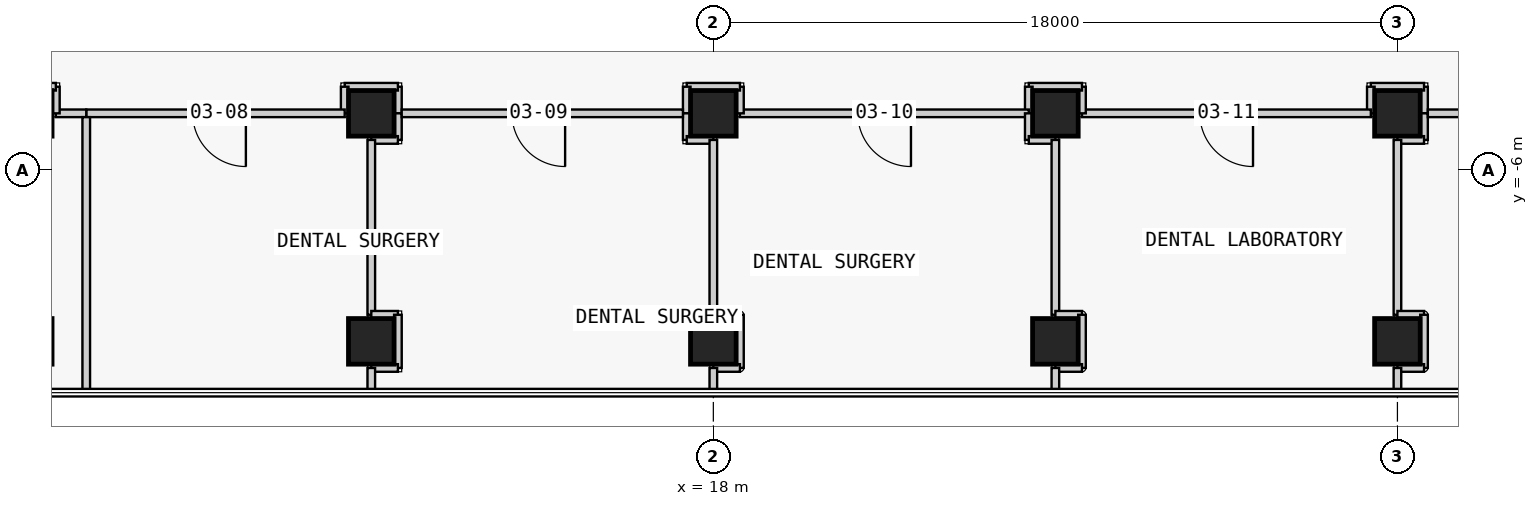
"""IFC4 building model, lengths in metres.
Left out: names, types, materials, properties, quantities, classifications, styles, units other than length and angle.
Written with IfcOpenShell. Run it as: python <this file> out.ifc"""

import sys

from ifc_helpers import new_model, si_unit, direction, frame, frame_2d, origin, origin_2d, place, context, subcontext, project, spatial, rectangle, extrude, element, fill, save


model = new_model("IFC4")
c1 = context("Model", 3, precision=1e-05, world=origin(), true_north=direction((0.0, 1.0)))
c2 = subcontext(c1, "Body", "Model", "MODEL_VIEW")
j1 = project(units=[si_unit("LENGTHUNIT", "METRE"), si_unit("PLANEANGLEUNIT", "RADIAN")], contexts=[c1])
p1 = place(None, origin())
s1 = spatial("IfcSite", under=j1, at=p1, CompositionType="ELEMENT")
p2 = place(p1, origin())
s2 = spatial("IfcBuilding", under=s1, at=p2, CompositionType="ELEMENT")
p3 = place(p2, frame((0.0, 0.0, 17.3)))
s3 = spatial("IfcBuildingStorey", under=s2, at=p3, CompositionType="ELEMENT", Elevation=17.3)
for number, where, z_axis, x_axis in (
    (1, (9.0, -10.5, 0.0), (0.0, 0.0, 1.0), (1.0, 0.0, 0.0)),
    (2, (9.0, -4.5, 0.0), (0.0, 0.0, 1.0), (1.0, 0.0, 0.0)),
    (3, (18.0, -10.5, 0.0), (0.0, 0.0, 1.0), (1.0, 0.0, 0.0)),
    (4, (18.0, -4.5, 0.0), (0.0, 0.0, 1.0), (1.0, 0.0, 0.0)),
    (5, (27.0, -10.5, 0.0), (0.0, 0.0, 1.0), (1.0, 0.0, 0.0)),
    (6, (27.0, -4.5, 0.0), (0.0, 0.0, 1.0), (1.0, 0.0, 0.0)),
    (7, (36.0, -10.5, 0.0), (0.0, 0.0, 1.0), (1.0, 0.0, 0.0)),
    (8, (36.0, -4.5, 0.0), (0.0, 0.0, 1.0), (1.0, 0.0, 0.0)),
):
    element("IfcColumn", number, at=place(p3, frame(where, z_axis=z_axis, x_axis=x_axis)), inside=s3, PredefinedType="COLUMN", context=c2, shape_type="SweptSolid", body=[
        extrude(rectangle(XDim=1.2, YDim=1.2, at=origin_2d()), origin(), (0.0, 0.0, 1.0), 4.5),
    ])
p4 = place(p3, frame((36.7, -4.5, 0.0), z_axis=(0.0, 0.0, 1.0), x_axis=(0.0, 1.0, 0.0)))
e9 = element("IfcWall", 9, at=p4, inside=s3, PredefinedType="PARTITIONING", context=c2, shape_type="SweptSolid", body=[
    extrude(rectangle(XDim=0.7, YDim=0.2, at=frame_2d((0.35, 0.0))), origin(), (0.0, 0.0, 1.0), 4.15),
])
p5 = place(p3, frame((36.7, -3.8, 0.0), z_axis=(0.0, 0.0, 1.0), x_axis=(-1.0, 0.0, 0.0)))
e10 = element("IfcWall", 10, at=p5, inside=s3, PredefinedType="PARTITIONING", context=c2, shape_type="SweptSolid", body=[
    extrude(rectangle(XDim=1.4, YDim=0.2, at=frame_2d((0.7, 0.0))), origin(), (0.0, 0.0, 1.0), 4.15),
])
p6 = place(p3, frame((35.3, -3.8, 0.0), z_axis=(0.0, 0.0, 1.0), x_axis=(0.0, -1.0, 0.0)))
e11 = element("IfcWall", 11, at=p6, inside=s3, PredefinedType="PARTITIONING", context=c2, shape_type="SweptSolid", body=[
    extrude(rectangle(XDim=0.7, YDim=0.2, at=frame_2d((0.35, 0.0))), origin(), (0.0, 0.0, 1.0), 4.15),
])
p7 = place(p3, frame((35.3, -4.5, 0.0), z_axis=(0.0, 0.0, 1.0), x_axis=(-1.0, 0.0, 0.0)))
e12 = element("IfcWall", 12, at=p7, inside=s3, PredefinedType="PARTITIONING", context=c2, shape_type="SweptSolid", body=[
    extrude(rectangle(XDim=7.6, YDim=0.2, at=frame_2d((3.8, 0.0))), origin(), (0.0, 0.0, 1.0), 4.15),
])
p8 = place(p7, frame((3.1, 0.0, 0.0)))
e13 = element("IfcOpeningElement", 13, at=p8, cuts=e12, PredefinedType="OPENING", context=c2, shape_type="SweptSolid", body=[
    extrude(rectangle(XDim=1.4, YDim=2.1, at=frame_2d((0.7, 1.05))), frame((0.0, 0.11, 0.0), z_axis=(0.0, -1.0, 0.0), x_axis=(1.0, 0.0, 0.0)), (0.0, 0.0, 1.0), 0.22),
])
p9 = place(p3, frame((27.7, -4.5, 0.0), z_axis=(0.0, 0.0, 1.0), x_axis=(0.0, 1.0, 0.0)))
e14 = element("IfcWall", 14, at=p9, inside=s3, PredefinedType="PARTITIONING", context=c2, shape_type="SweptSolid", body=[
    extrude(rectangle(XDim=0.7, YDim=0.2, at=frame_2d((0.35, 0.0))), origin(), (0.0, 0.0, 1.0), 4.15),
])
p10 = place(p3, frame((27.7, -3.8, 0.0), z_axis=(0.0, 0.0, 1.0), x_axis=(-1.0, 0.0, 0.0)))
e15 = element("IfcWall", 15, at=p10, inside=s3, PredefinedType="PARTITIONING", context=c2, shape_type="SweptSolid", body=[
    extrude(rectangle(XDim=1.4, YDim=0.2, at=frame_2d((0.7, 0.0))), origin(), (0.0, 0.0, 1.0), 4.15),
])
p11 = place(p3, frame((26.3, -3.8, 0.0), z_axis=(0.0, 0.0, 1.0), x_axis=(0.0, -1.0, 0.0)))
e16 = element("IfcWall", 16, at=p11, inside=s3, PredefinedType="PARTITIONING", context=c2, shape_type="SweptSolid", body=[
    extrude(rectangle(XDim=0.7, YDim=0.2, at=frame_2d((0.35, 0.0))), origin(), (0.0, 0.0, 1.0), 4.15),
])
p12 = place(p3, frame((26.3, -4.5, 0.0), z_axis=(0.0, 0.0, 1.0), x_axis=(-1.0, 0.0, 0.0)))
e17 = element("IfcWall", 17, at=p12, inside=s3, PredefinedType="PARTITIONING", context=c2, shape_type="SweptSolid", body=[
    extrude(rectangle(XDim=7.6, YDim=0.2, at=frame_2d((3.8, 0.0))), origin(), (0.0, 0.0, 1.0), 4.15),
])
p13 = place(p12, frame((3.1, 0.0, 0.0)))
e18 = element("IfcOpeningElement", 18, at=p13, cuts=e17, PredefinedType="OPENING", context=c2, shape_type="SweptSolid", body=[
    extrude(rectangle(XDim=1.4, YDim=2.1, at=frame_2d((0.7, 1.05))), frame((0.0, 0.11, 0.0), z_axis=(0.0, -1.0, 0.0), x_axis=(1.0, 0.0, 0.0)), (0.0, 0.0, 1.0), 0.22),
])
p14 = place(p3, frame((18.7, -4.5, 0.0), z_axis=(0.0, 0.0, 1.0), x_axis=(0.0, 1.0, 0.0)))
e19 = element("IfcWall", 19, at=p14, inside=s3, PredefinedType="PARTITIONING", context=c2, shape_type="SweptSolid", body=[
    extrude(rectangle(XDim=0.7, YDim=0.2, at=frame_2d((0.35, 0.0))), origin(), (0.0, 0.0, 1.0), 4.15),
])
p15 = place(p3, frame((18.7, -3.8, 0.0), z_axis=(0.0, 0.0, 1.0), x_axis=(-1.0, 0.0, 0.0)))
e20 = element("IfcWall", 20, at=p15, inside=s3, PredefinedType="PARTITIONING", context=c2, shape_type="SweptSolid", body=[
    extrude(rectangle(XDim=1.4, YDim=0.2, at=frame_2d((0.7, 0.0))), origin(), (0.0, 0.0, 1.0), 4.15),
])
for number, where, z_axis, x_axis in (
    (21, (17.3, -3.8, 0.0), (0.0, 0.0, 1.0), (0.0, -1.0, 0.0)),
    (22, (9.7, -4.5, 0.0), (0.0, 0.0, 1.0), (0.0, 1.0, 0.0)),
):
    element("IfcWall", number, at=place(p3, frame(where, z_axis=z_axis, x_axis=x_axis)), inside=s3, PredefinedType="PARTITIONING", context=c2, shape_type="SweptSolid", body=[
        extrude(rectangle(XDim=0.7, YDim=0.2, at=frame_2d((0.35, 0.0))), origin(), (0.0, 0.0, 1.0), 4.15),
    ])
p16 = place(p3, frame((9.7, -3.8, 0.0), z_axis=(0.0, 0.0, 1.0), x_axis=(-1.0, 0.0, 0.0)))
e23 = element("IfcWall", 23, at=p16, inside=s3, PredefinedType="PARTITIONING", context=c2, shape_type="SweptSolid", body=[
    extrude(rectangle(XDim=1.4, YDim=0.2, at=frame_2d((0.7, 0.0))), origin(), (0.0, 0.0, 1.0), 4.15),
])
p17 = place(p3, frame((8.3, -3.8, 0.0), z_axis=(0.0, 0.0, 1.0), x_axis=(0.0, -1.0, 0.0)))
e24 = element("IfcWall", 24, at=p17, inside=s3, PredefinedType="PARTITIONING", context=c2, shape_type="SweptSolid", body=[
    extrude(rectangle(XDim=0.7, YDim=0.2, at=frame_2d((0.35, 0.0))), origin(), (0.0, 0.0, 1.0), 4.15),
])
p18 = place(p3, frame((8.3, -4.5, 0.0), z_axis=(0.0, 0.0, 1.0), x_axis=(-1.0, 0.0, 0.0)))
e25 = element("IfcWall", 25, at=p18, inside=s3, PredefinedType="PARTITIONING", context=c2, shape_type="SweptSolid", body=[
    extrude(rectangle(XDim=6.8, YDim=0.2, at=frame_2d((3.4, 0.0))), origin(), (0.0, 0.0, 1.0), 4.15),
])
p19 = place(p18, frame((2.6, 0.0, 0.0)))
e26 = element("IfcOpeningElement", 26, at=p19, cuts=e25, PredefinedType="OPENING", context=c2, shape_type="SweptSolid", body=[
    extrude(rectangle(XDim=1.4, YDim=2.1, at=frame_2d((0.7, 1.05))), frame((0.0, 0.11, 0.0), z_axis=(0.0, -1.0, 0.0), x_axis=(1.0, 0.0, 0.0)), (0.0, 0.0, 1.0), 0.22),
])
for number, where, z_axis, x_axis in (
    (27, (17.3, -4.5, 0.0), (0.0, 0.0, 1.0), (0.0, -1.0, 0.0)),
    (28, (17.3, -5.2, 0.0), (0.0, 0.0, 1.0), (1.0, 0.0, 0.0)),
):
    element("IfcWall", number, at=place(p3, frame(where, z_axis=z_axis, x_axis=x_axis)), inside=s3, PredefinedType="PARTITIONING", context=c2, shape_type="SweptSolid", body=[
        extrude(rectangle(XDim=0.7, YDim=0.2, at=frame_2d((0.35, 0.0))), origin(), (0.0, 0.0, 1.0), 4.15),
    ])
p20 = place(p3, frame((18.0, -5.2, 0.0), z_axis=(0.0, 0.0, 1.0), x_axis=(0.0, -1.0, 0.0)))
e29 = element("IfcWall", 29, at=p20, inside=s3, PredefinedType="PARTITIONING", context=c2, shape_type="SweptSolid", body=[
    extrude(rectangle(XDim=4.6, YDim=0.2, at=frame_2d((2.3, 0.0))), origin(), (0.0, 0.0, 1.0), 4.15),
])
p21 = place(p3, frame((18.0, -9.8, 0.0), z_axis=(0.0, 0.0, 1.0), x_axis=(1.0, 0.0, 0.0)))
e30 = element("IfcWall", 30, at=p21, inside=s3, PredefinedType="PARTITIONING", context=c2, shape_type="SweptSolid", body=[
    extrude(rectangle(XDim=0.7, YDim=0.2, at=frame_2d((0.35, 0.0))), origin(), (0.0, 0.0, 1.0), 4.15),
])
p22 = place(p3, frame((18.7, -9.8, 0.0), z_axis=(0.0, 0.0, 1.0), x_axis=(0.0, -1.0, 0.0)))
e31 = element("IfcWall", 31, at=p22, inside=s3, PredefinedType="PARTITIONING", context=c2, shape_type="SweptSolid", body=[
    extrude(rectangle(XDim=1.4, YDim=0.2, at=frame_2d((0.7, 0.0))), origin(), (0.0, 0.0, 1.0), 4.15),
])
p23 = place(p3, frame((18.7, -11.2, 0.0), z_axis=(0.0, 0.0, 1.0), x_axis=(-1.0, 0.0, 0.0)))
e32 = element("IfcWall", 32, at=p23, inside=s3, PredefinedType="PARTITIONING", context=c2, shape_type="SweptSolid", body=[
    extrude(rectangle(XDim=0.7, YDim=0.2, at=frame_2d((0.35, 0.0))), origin(), (0.0, 0.0, 1.0), 4.15),
])
p24 = place(p3, frame((18.0, -11.2, 0.0), z_axis=(0.0, 0.0, 1.0), x_axis=(0.0, -1.0, 0.0)))
e33 = element("IfcWall", 33, at=p24, inside=s3, PredefinedType="PARTITIONING", context=c2, shape_type="SweptSolid", body=[
    extrude(rectangle(XDim=0.65, YDim=0.2, at=frame_2d((0.325, 0.0))), origin(), (0.0, 0.0, 1.0), 4.15),
])
for number, where, z_axis, x_axis in (
    (34, (26.3, -4.5, 0.0), (0.0, 0.0, 1.0), (0.0, -1.0, 0.0)),
    (35, (26.3, -5.2, 0.0), (0.0, 0.0, 1.0), (1.0, 0.0, 0.0)),
):
    element("IfcWall", number, at=place(p3, frame(where, z_axis=z_axis, x_axis=x_axis)), inside=s3, PredefinedType="PARTITIONING", context=c2, shape_type="SweptSolid", body=[
        extrude(rectangle(XDim=0.7, YDim=0.2, at=frame_2d((0.35, 0.0))), origin(), (0.0, 0.0, 1.0), 4.15),
    ])
p25 = place(p3, frame((27.0, -5.2, 0.0), z_axis=(0.0, 0.0, 1.0), x_axis=(0.0, -1.0, 0.0)))
e36 = element("IfcWall", 36, at=p25, inside=s3, PredefinedType="PARTITIONING", context=c2, shape_type="SweptSolid", body=[
    extrude(rectangle(XDim=4.6, YDim=0.2, at=frame_2d((2.3, 0.0))), origin(), (0.0, 0.0, 1.0), 4.15),
])
p26 = place(p3, frame((27.0, -9.8, 0.0), z_axis=(0.0, 0.0, 1.0), x_axis=(1.0, 0.0, 0.0)))
e37 = element("IfcWall", 37, at=p26, inside=s3, PredefinedType="PARTITIONING", context=c2, shape_type="SweptSolid", body=[
    extrude(rectangle(XDim=0.7, YDim=0.2, at=frame_2d((0.35, 0.0))), origin(), (0.0, 0.0, 1.0), 4.15),
])
p27 = place(p3, frame((27.7, -9.8, 0.0), z_axis=(0.0, 0.0, 1.0), x_axis=(0.0, -1.0, 0.0)))
e38 = element("IfcWall", 38, at=p27, inside=s3, PredefinedType="PARTITIONING", context=c2, shape_type="SweptSolid", body=[
    extrude(rectangle(XDim=1.4, YDim=0.2, at=frame_2d((0.7, 0.0))), origin(), (0.0, 0.0, 1.0), 4.15),
])
p28 = place(p3, frame((27.7, -11.2, 0.0), z_axis=(0.0, 0.0, 1.0), x_axis=(-1.0, 0.0, 0.0)))
e39 = element("IfcWall", 39, at=p28, inside=s3, PredefinedType="PARTITIONING", context=c2, shape_type="SweptSolid", body=[
    extrude(rectangle(XDim=0.7, YDim=0.2, at=frame_2d((0.35, 0.0))), origin(), (0.0, 0.0, 1.0), 4.15),
])
p29 = place(p3, frame((27.0, -11.2, 0.0), z_axis=(0.0, 0.0, 1.0), x_axis=(0.0, -1.0, 0.0)))
e40 = element("IfcWall", 40, at=p29, inside=s3, PredefinedType="PARTITIONING", context=c2, shape_type="SweptSolid", body=[
    extrude(rectangle(XDim=0.65, YDim=0.2, at=frame_2d((0.325, 0.0))), origin(), (0.0, 0.0, 1.0), 4.15),
])
for number, where, z_axis, x_axis in (
    (41, (9.7, -4.5, 0.0), (0.0, 0.0, 1.0), (0.0, -1.0, 0.0)),
    (42, (9.7, -5.2, 0.0), (0.0, 0.0, 1.0), (-1.0, 0.0, 0.0)),
):
    element("IfcWall", number, at=place(p3, frame(where, z_axis=z_axis, x_axis=x_axis)), inside=s3, PredefinedType="PARTITIONING", context=c2, shape_type="SweptSolid", body=[
        extrude(rectangle(XDim=0.7, YDim=0.2, at=frame_2d((0.35, 0.0))), origin(), (0.0, 0.0, 1.0), 4.15),
    ])
p30 = place(p3, frame((9.0, -5.2, 0.0), z_axis=(0.0, 0.0, 1.0), x_axis=(0.0, -1.0, 0.0)))
e43 = element("IfcWall", 43, at=p30, inside=s3, PredefinedType="PARTITIONING", context=c2, shape_type="SweptSolid", body=[
    extrude(rectangle(XDim=4.6, YDim=0.2, at=frame_2d((2.3, 0.0))), origin(), (0.0, 0.0, 1.0), 4.15),
])
p31 = place(p3, frame((9.0, -9.8, 0.0), z_axis=(0.0, 0.0, 1.0), x_axis=(1.0, 0.0, 0.0)))
e44 = element("IfcWall", 44, at=p31, inside=s3, PredefinedType="PARTITIONING", context=c2, shape_type="SweptSolid", body=[
    extrude(rectangle(XDim=0.7, YDim=0.2, at=frame_2d((0.35, 0.0))), origin(), (0.0, 0.0, 1.0), 4.15),
])
p32 = place(p3, frame((9.7, -9.8, 0.0), z_axis=(0.0, 0.0, 1.0), x_axis=(0.0, -1.0, 0.0)))
e45 = element("IfcWall", 45, at=p32, inside=s3, PredefinedType="PARTITIONING", context=c2, shape_type="SweptSolid", body=[
    extrude(rectangle(XDim=1.4, YDim=0.2, at=frame_2d((0.7, 0.0))), origin(), (0.0, 0.0, 1.0), 4.15),
])
p33 = place(p3, frame((9.7, -11.2, 0.0), z_axis=(0.0, 0.0, 1.0), x_axis=(-1.0, 0.0, 0.0)))
e46 = element("IfcWall", 46, at=p33, inside=s3, PredefinedType="PARTITIONING", context=c2, shape_type="SweptSolid", body=[
    extrude(rectangle(XDim=0.7, YDim=0.2, at=frame_2d((0.35, 0.0))), origin(), (0.0, 0.0, 1.0), 4.15),
])
p34 = place(p3, frame((9.0, -11.2, 0.0), z_axis=(0.0, 0.0, 1.0), x_axis=(0.0, -1.0, 0.0)))
e47 = element("IfcWall", 47, at=p34, inside=s3, PredefinedType="PARTITIONING", context=c2, shape_type="SweptSolid", body=[
    extrude(rectangle(XDim=0.65, YDim=0.2, at=frame_2d((0.325, 0.0))), origin(), (0.0, 0.0, 1.0), 4.15),
])
for number, where, z_axis, x_axis in (
    (48, (36.7, -4.5, 0.0), (0.0, 0.0, 1.0), (0.0, -1.0, 0.0)),
    (49, (36.7, -5.2, 0.0), (0.0, 0.0, 1.0), (-1.0, 0.0, 0.0)),
):
    element("IfcWall", number, at=place(p3, frame(where, z_axis=z_axis, x_axis=x_axis)), inside=s3, PredefinedType="PARTITIONING", context=c2, shape_type="SweptSolid", body=[
        extrude(rectangle(XDim=0.7, YDim=0.2, at=frame_2d((0.35, 0.0))), origin(), (0.0, 0.0, 1.0), 4.15),
    ])
p35 = place(p3, frame((36.0, -5.2, 0.0), z_axis=(0.0, 0.0, 1.0), x_axis=(0.0, -1.0, 0.0)))
e50 = element("IfcWall", 50, at=p35, inside=s3, PredefinedType="PARTITIONING", context=c2, shape_type="SweptSolid", body=[
    extrude(rectangle(XDim=4.6, YDim=0.2, at=frame_2d((2.3, 0.0))), origin(), (0.0, 0.0, 1.0), 4.15),
])
p36 = place(p3, frame((36.0, -9.8, 0.0), z_axis=(0.0, 0.0, 1.0), x_axis=(1.0, 0.0, 0.0)))
e51 = element("IfcWall", 51, at=p36, inside=s3, PredefinedType="PARTITIONING", context=c2, shape_type="SweptSolid", body=[
    extrude(rectangle(XDim=0.7, YDim=0.2, at=frame_2d((0.35, 0.0))), origin(), (0.0, 0.0, 1.0), 4.15),
])
p37 = place(p3, frame((36.7, -9.8, 0.0), z_axis=(0.0, 0.0, 1.0), x_axis=(0.0, -1.0, 0.0)))
e52 = element("IfcWall", 52, at=p37, inside=s3, PredefinedType="PARTITIONING", context=c2, shape_type="SweptSolid", body=[
    extrude(rectangle(XDim=1.4, YDim=0.2, at=frame_2d((0.7, 0.0))), origin(), (0.0, 0.0, 1.0), 4.15),
])
p38 = place(p3, frame((36.7, -11.2, 0.0), z_axis=(0.0, 0.0, 1.0), x_axis=(-1.0, 0.0, 0.0)))
e53 = element("IfcWall", 53, at=p38, inside=s3, PredefinedType="PARTITIONING", context=c2, shape_type="SweptSolid", body=[
    extrude(rectangle(XDim=0.7, YDim=0.2, at=frame_2d((0.35, 0.0))), origin(), (0.0, 0.0, 1.0), 4.15),
])
p39 = place(p3, frame((36.0, -11.2, 0.0), z_axis=(0.0, 0.0, 1.0), x_axis=(0.0, -1.0, 0.0)))
e54 = element("IfcWall", 54, at=p39, inside=s3, PredefinedType="PARTITIONING", context=c2, shape_type="SweptSolid", body=[
    extrude(rectangle(XDim=0.65, YDim=0.2, at=frame_2d((0.325, 0.0))), origin(), (0.0, 0.0, 1.0), 4.15),
])
p40 = place(p3, frame((17.2, -4.5, 0.0), z_axis=(0.0, 0.0, 1.0), x_axis=(-1.0, 0.0, 0.0)))
e55 = element("IfcWall", 55, at=p40, inside=s3, PredefinedType="PARTITIONING", context=c2, shape_type="SweptSolid", body=[
    extrude(rectangle(XDim=7.4, YDim=0.2, at=frame_2d((3.7, 0.0))), origin(), (0.0, 0.0, 1.0), 4.15),
])
p41 = place(p40, frame((3.1, 0.0, 0.0)))
e56 = element("IfcOpeningElement", 56, at=p41, cuts=e55, PredefinedType="OPENING", context=c2, shape_type="SweptSolid", body=[
    extrude(rectangle(XDim=1.4, YDim=2.1, at=frame_2d((0.7, 1.05))), frame((0.0, 0.11, 0.0), z_axis=(0.0, -1.0, 0.0), x_axis=(1.0, 0.0, 0.0)), (0.0, 0.0, 1.0), 0.22),
])
p42 = place(p3, frame((44.2, -4.5, 0.0), z_axis=(0.0, 0.0, 1.0), x_axis=(-1.0, 0.0, 0.0)))
e57 = element("IfcWall", 57, at=p42, inside=s3, PredefinedType="PARTITIONING", context=c2, shape_type="SweptSolid", body=[
    extrude(rectangle(XDim=7.4, YDim=0.2, at=frame_2d((3.7, 0.0))), origin(), (0.0, 0.0, 1.0), 4.15),
])
p43 = place(p42, frame((3.1, 0.0, 0.0)))
e58 = element("IfcOpeningElement", 58, at=p43, cuts=e57, PredefinedType="OPENING", context=c2, shape_type="SweptSolid", body=[
    extrude(rectangle(XDim=1.4, YDim=2.1, at=frame_2d((0.7, 1.05))), frame((0.0, 0.11, 0.0), z_axis=(0.0, -1.0, 0.0), x_axis=(1.0, 0.0, 0.0)), (0.0, 0.0, 1.0), 0.22),
])
p44 = place(p3, frame((1.5, -4.5, 0.0), z_axis=(0.0, 0.0, 1.0), x_axis=(-1.0, 0.0, 0.0)))
e59 = element("IfcWall", 59, at=p44, inside=s3, PredefinedType="PARTITIONING", context=c2, shape_type="SweptSolid", body=[
    extrude(rectangle(XDim=0.8, YDim=0.2, at=frame_2d((0.4, 0.0))), origin(), (0.0, 0.0, 1.0), 4.15),
])
p45 = place(p3, frame((0.7, -4.5, 0.0), z_axis=(0.0, 0.0, 1.0), x_axis=(0.0, 1.0, 0.0)))
e60 = element("IfcWall", 60, at=p45, inside=s3, PredefinedType="PARTITIONING", context=c2, shape_type="SweptSolid", body=[
    extrude(rectangle(XDim=0.7, YDim=0.2, at=frame_2d((0.35, 0.0))), origin(), (0.0, 0.0, 1.0), 4.15),
])
p46 = place(p3, frame((0.7, -3.8, 0.0), z_axis=(0.0, 0.0, 1.0), x_axis=(-1.0, 0.0, 0.0)))
e61 = element("IfcWall", 61, at=p46, inside=s3, PredefinedType="PARTITIONING", context=c2, shape_type="SweptSolid", body=[
    extrude(rectangle(XDim=1.4, YDim=0.2, at=frame_2d((0.7, 0.0))), origin(), (0.0, 0.0, 1.0), 4.15),
])
p47 = place(p3, frame((1.5, -4.6, 0.0), z_axis=(0.0, 0.0, 1.0), x_axis=(0.0, -1.0, 0.0)))
e62 = element("IfcWall", 62, at=p47, inside=s3, PredefinedType="PARTITIONING", context=c2, shape_type="SweptSolid", body=[
    extrude(rectangle(XDim=7.25, YDim=0.2, at=frame_2d((3.625, 0.0))), origin(), (0.0, 0.0, 1.0), 4.15),
])
p48 = place(p19, origin())
e63 = element("IfcDoor", 63, at=p48, inside=s3, OperationType="SINGLE_SWING_LEFT", PredefinedType="DOOR", context=c2, shape_type="SweptSolid", body=[
    extrude(rectangle(XDim=1.4, YDim=2.1, at=frame_2d((0.7, 1.05))), frame((0.0, 0.025, 0.0), z_axis=(0.0, -1.0, 0.0), x_axis=(1.0, 0.0, 0.0)), (0.0, 0.0, 1.0), 0.05),
])
fill(e26, e63)
p49 = place(p41, origin())
e64 = element("IfcDoor", 64, at=p49, inside=s3, OperationType="SINGLE_SWING_LEFT", PredefinedType="DOOR", context=c2, shape_type="SweptSolid", body=[
    extrude(rectangle(XDim=1.4, YDim=2.1, at=frame_2d((0.7, 1.05))), frame((0.0, 0.025, 0.0), z_axis=(0.0, -1.0, 0.0), x_axis=(1.0, 0.0, 0.0)), (0.0, 0.0, 1.0), 0.05),
])
fill(e56, e64)
p50 = place(p13, origin())
e65 = element("IfcDoor", 65, at=p50, inside=s3, OperationType="SINGLE_SWING_LEFT", PredefinedType="DOOR", context=c2, shape_type="SweptSolid", body=[
    extrude(rectangle(XDim=1.4, YDim=2.1, at=frame_2d((0.7, 1.05))), frame((0.0, 0.025, 0.0), z_axis=(0.0, -1.0, 0.0), x_axis=(1.0, 0.0, 0.0)), (0.0, 0.0, 1.0), 0.05),
])
fill(e18, e65)
p51 = place(p8, origin())
e66 = element("IfcDoor", 66, at=p51, inside=s3, OperationType="SINGLE_SWING_LEFT", PredefinedType="DOOR", context=c2, shape_type="SweptSolid", body=[
    extrude(rectangle(XDim=1.4, YDim=2.1, at=frame_2d((0.7, 1.05))), frame((0.0, 0.025, 0.0), z_axis=(0.0, -1.0, 0.0), x_axis=(1.0, 0.0, 0.0)), (0.0, 0.0, 1.0), 0.05),
])
fill(e13, e66)
save(model, sys.argv[1])
